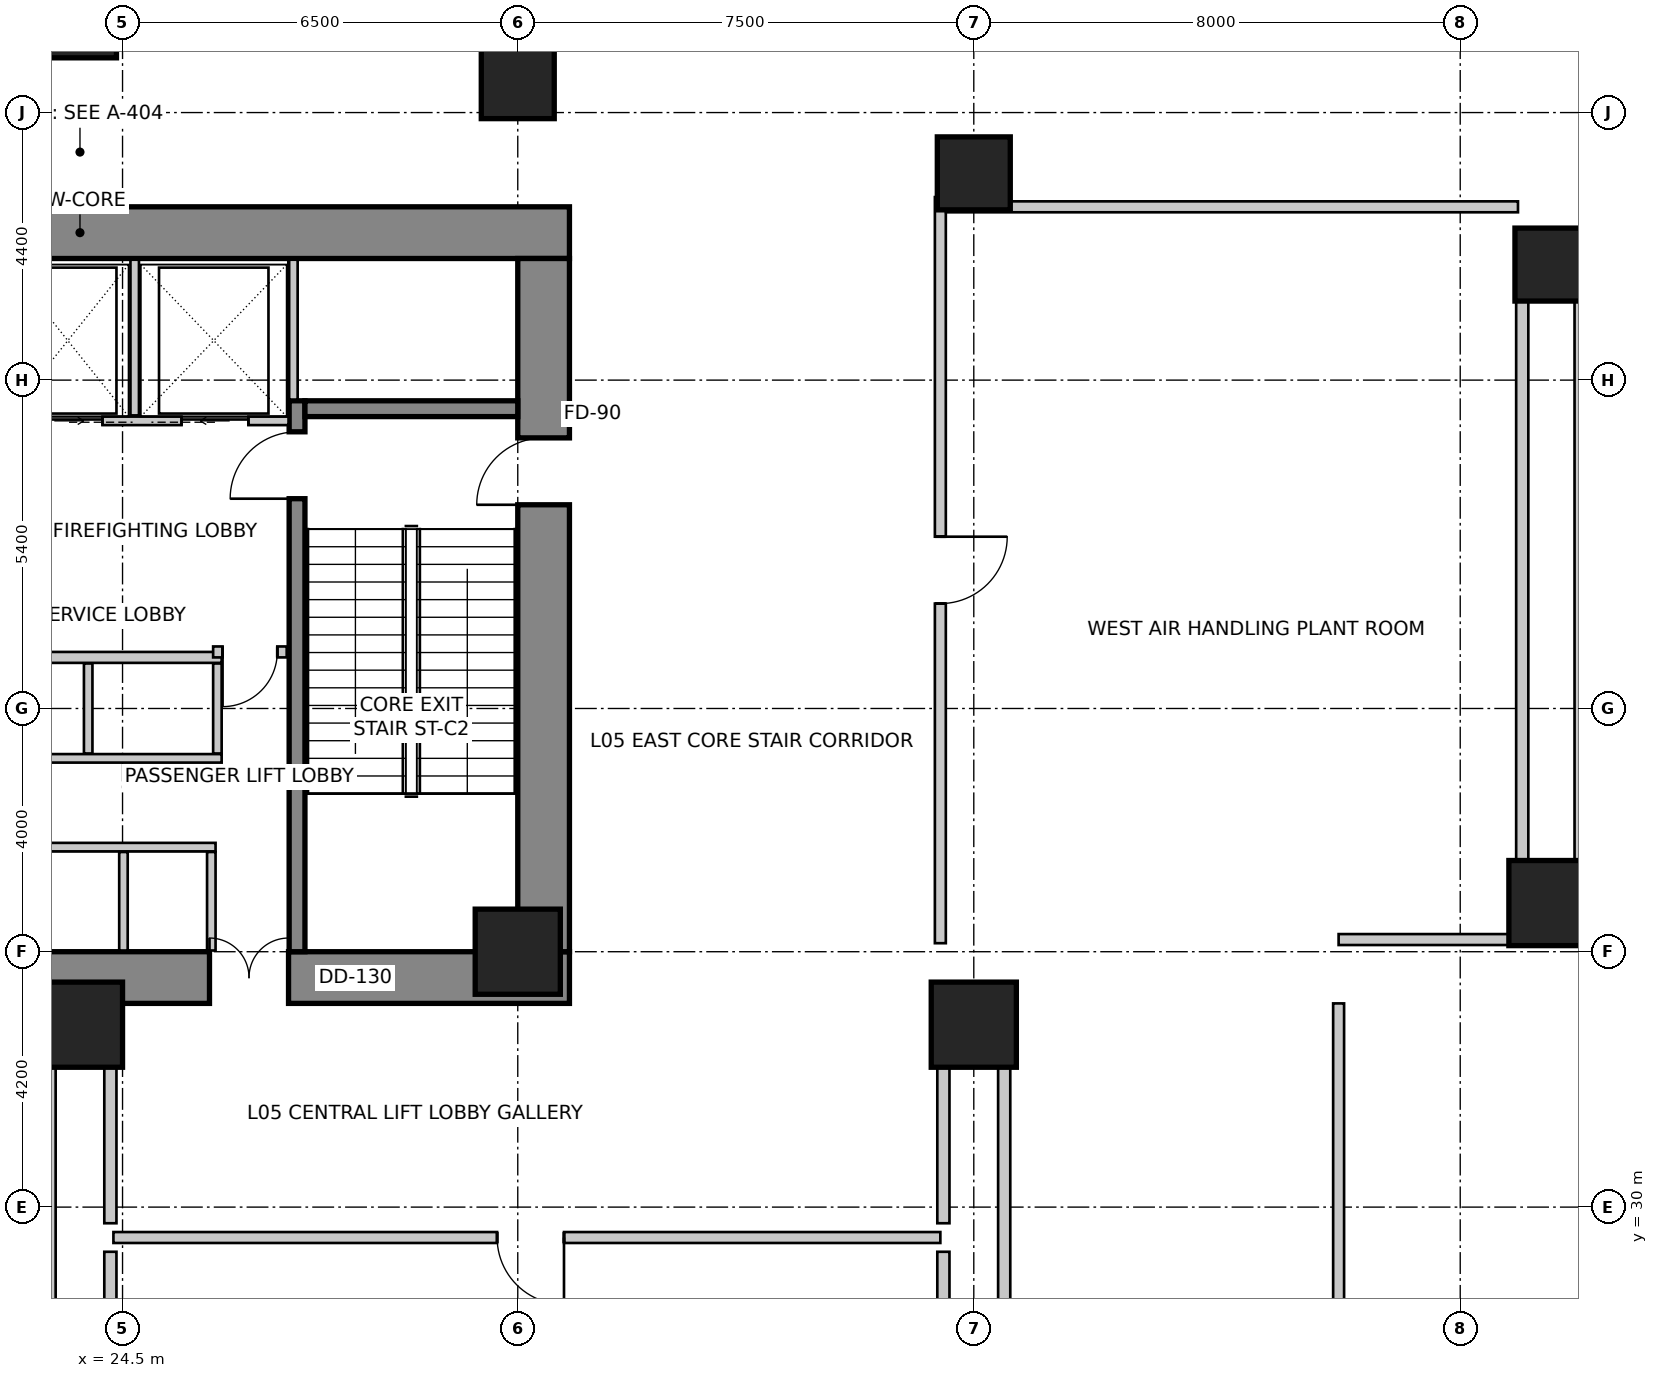
"""IFC4 building model, lengths in metres.
Left out: names, types, materials, properties, quantities, classifications, styles, units other than length and angle.
Written with IfcOpenShell. Run it as: python <this file> out.ifc"""

import sys

from ifc_helpers import new_model, si_unit, direction, frame, frame_2d, origin, origin_2d, place, context, subcontext, project, spatial, rectangle, extrude, source, transform, mapped, element, fill, save


model = new_model("IFC4")
c1 = context("Model", 3, precision=1e-05, world=origin(), true_north=direction((0.0, 1.0)))
c2 = subcontext(c1, "Body", "Model", "MODEL_VIEW")
j1 = project(units=[si_unit("LENGTHUNIT", "METRE"), si_unit("PLANEANGLEUNIT", "RADIAN")], contexts=[c1])
p1 = place(None, origin())
s1 = spatial("IfcSite", under=j1, at=p1, CompositionType="ELEMENT")
p2 = place(p1, origin())
s2 = spatial("IfcBuilding", under=s1, at=p2, CompositionType="ELEMENT")
p3 = place(p2, frame((0.0, 0.0, 21.6)))
s3 = spatial("IfcBuildingStorey", under=s2, at=p3, CompositionType="ELEMENT", Elevation=21.6)
p4 = place(p3, frame((15.75, 46.025, 0.0), z_axis=(0.0, 0.0, 1.0), x_axis=(1.0, 0.0, 0.0)))
e1 = element("IfcWall", 1, at=p4, inside=s3, PredefinedType="SHEAR", context=c2, shape_type="SweptSolid", body=[
    extrude(rectangle(XDim=16.1, YDim=0.85, at=frame_2d((8.05, 0.0))), origin(), (0.0, 0.0, 1.0), 5.4),
])
p5 = place(p3, frame((15.75, 33.775, 0.0), z_axis=(0.0, 0.0, 1.0), x_axis=(1.0, 0.0, 0.0)))
e2 = element("IfcWall", 2, at=p5, inside=s3, PredefinedType="SHEAR", context=c2, shape_type="SweptSolid", body=[
    extrude(rectangle(XDim=16.1, YDim=0.85, at=frame_2d((8.05, 0.0))), origin(), (0.0, 0.0, 1.0), 5.4),
])
m1 = source(origin(), c2, "Body", "SweptSolid", [
    extrude(rectangle(XDim=1.3, YDim=2.15, at=frame_2d((0.65, 1.075))), frame((0.0, 0.435, 0.0), z_axis=(0.0, -1.0, 0.0), x_axis=(1.0, 0.0, 0.0)), (0.0, 0.0, 1.0), 0.87),
])
p6 = place(p5, frame((10.18, 0.0, 0.0)))
e3 = element("IfcOpeningElement", 3, at=p6, cuts=e2, PredefinedType="OPENING", context=c2, shape_type="MappedRepresentation", body=[
    mapped(m1, transform((0.0, 0.0, 0.0), scale=1.0)),
])
p7 = place(p3, frame((31.425, 34.2, 0.0), z_axis=(0.0, 0.0, 1.0), x_axis=(0.0, 1.0, 0.0)))
e4 = element("IfcWall", 4, at=p7, inside=s3, PredefinedType="SHEAR", context=c2, shape_type="SweptSolid", body=[
    extrude(rectangle(XDim=11.4, YDim=0.85, at=frame_2d((5.7, 0.0))), origin(), (0.0, 0.0, 1.0), 5.4),
])
m2 = source(origin(), c2, "Body", "SweptSolid", [
    extrude(rectangle(XDim=1.1, YDim=2.15, at=frame_2d((0.55, 1.075))), frame((0.0, 0.435, 0.0), z_axis=(0.0, -1.0, 0.0), x_axis=(1.0, 0.0, 0.0)), (0.0, 0.0, 1.0), 0.87),
])
p8 = place(p7, frame((7.35, 0.0, 0.0)))
e5 = element("IfcOpeningElement", 5, at=p8, cuts=e4, PredefinedType="OPENING", context=c2, shape_type="MappedRepresentation", body=[
    mapped(m2, transform((0.0, 0.0, 0.0), scale=1.0)),
])
p9 = place(p3, frame((27.37, 34.2, 0.0), z_axis=(0.0, 0.0, 1.0), x_axis=(0.0, 1.0, 0.0)))
e6 = element("IfcWall", 6, at=p9, inside=s3, PredefinedType="SHEAR", context=c2, shape_type="SweptSolid", body=[
    extrude(rectangle(XDim=9.06, YDim=0.26, at=frame_2d((4.53, 0.0))), origin(), (0.0, 0.0, 1.0), 5.4),
])
m3 = source(origin(), c2, "Body", "SweptSolid", [
    extrude(rectangle(XDim=1.1, YDim=2.15, at=frame_2d((0.55, 1.075))), frame((0.0, 0.14, 0.0), z_axis=(0.0, -1.0, 0.0), x_axis=(1.0, 0.0, 0.0)), (0.0, 0.0, 1.0), 0.28),
])
p10 = place(p9, frame((7.45, 0.0, 0.0)))
e7 = element("IfcOpeningElement", 7, at=p10, cuts=e6, PredefinedType="OPENING", context=c2, shape_type="MappedRepresentation", body=[
    mapped(m3, transform((0.0, 0.0, 0.0), scale=1.0)),
])
p11 = place(p3, frame((27.5, 43.13, 0.0), z_axis=(0.0, 0.0, 1.0), x_axis=(1.0, 0.0, 0.0)))
e8 = element("IfcWall", 8, at=p11, inside=s3, PredefinedType="SHEAR", context=c2, shape_type="SweptSolid", body=[
    extrude(rectangle(XDim=3.5, YDim=0.26, at=frame_2d((1.75, 0.0))), origin(), (0.0, 0.0, 1.0), 5.4),
])
m4 = source(origin(), c2, "Body", "SweptSolid", [
    extrude(rectangle(XDim=1.4, YDim=1.4, at=origin_2d()), origin(), (0.0, 0.0, 1.0), 5.4),
])
for number, where, z_axis, x_axis in (
    (9, (23.8, 33.0, 0.0), (0.0, 0.0, 1.0), (1.0, 0.0, 0.0)),
    (10, (31.0, 34.2, 0.0), (0.0, 0.0, 1.0), (1.0, 0.0, 0.0)),
    (11, (38.5, 33.0, 0.0), (0.0, 0.0, 1.0), (1.0, 0.0, 0.0)),
    (12, (48.0, 35.0, 0.0), (0.0, 0.0, 1.0), (1.0, 0.0, 0.0)),
):
    element("IfcColumn", number, at=place(p3, frame(where, z_axis=z_axis, x_axis=x_axis)), inside=s3, PredefinedType="COLUMN", context=c2, shape_type="MappedRepresentation", body=[
        mapped(m4, transform((0.0, 0.0, 0.0), scale=1.0)),
    ])
m5 = source(origin(), c2, "Body", "SweptSolid", [
    extrude(rectangle(XDim=1.2, YDim=1.2, at=origin_2d()), origin(), (0.0, 0.0, 1.0), 5.4),
])
for number, where, z_axis, x_axis in (
    (13, (23.8, 49.5, 0.0), (0.0, 0.0, 1.0), (1.0, 0.0, 0.0)),
    (14, (31.0, 48.5, 0.0), (0.0, 0.0, 1.0), (1.0, 0.0, 0.0)),
    (15, (38.5, 47.0, 0.0), (0.0, 0.0, 1.0), (1.0, 0.0, 0.0)),
    (16, (48.0, 45.5, 0.0), (0.0, 0.0, 1.0), (1.0, 0.0, 0.0)),
):
    element("IfcColumn", number, at=place(p3, frame(where, z_axis=z_axis, x_axis=x_axis)), inside=s3, PredefinedType="COLUMN", context=c2, shape_type="MappedRepresentation", body=[
        mapped(m5, transform((0.0, 0.0, 0.0), scale=1.0)),
    ])
p12 = place(p3, frame((20.37, 42.93, 0.0), z_axis=(0.0, 0.0, 1.0), x_axis=(1.0, 0.0, 0.0)))
e17 = element("IfcWall", 17, at=p12, inside=s3, PredefinedType="SOLIDWALL", context=c2, shape_type="SweptSolid", body=[
    extrude(rectangle(XDim=6.86, YDim=0.14, at=frame_2d((3.43, 0.0))), origin(), (0.0, 0.0, 1.0), 5.05),
])
m6 = source(origin(), c2, "Body", "SweptSolid", [
    extrude(rectangle(XDim=1.1, YDim=2.15, at=frame_2d((0.55, 1.075))), frame((0.0, 0.08, 0.0), z_axis=(0.0, -1.0, 0.0), x_axis=(1.0, 0.0, 0.0)), (0.0, 0.0, 1.0), 0.16),
])
p13 = place(p12, frame((0.5, 0.0, 0.0)))
e18 = element("IfcOpeningElement", 18, at=p13, cuts=e17, PredefinedType="OPENING", context=c2, shape_type="MappedRepresentation", body=[
    mapped(m6, transform((0.0, 0.0, 0.0), scale=1.0)),
])
p14 = place(p12, frame((2.7, 0.0, 0.0)))
e19 = element("IfcOpeningElement", 19, at=p14, cuts=e17, PredefinedType="OPENING", context=c2, shape_type="MappedRepresentation", body=[
    mapped(m6, transform((0.0, 0.0, 0.0), scale=1.0)),
])
p15 = place(p12, frame((5.1, 0.0, 0.0)))
e20 = element("IfcOpeningElement", 20, at=p15, cuts=e17, PredefinedType="OPENING", context=c2, shape_type="MappedRepresentation", body=[
    mapped(m6, transform((0.0, 0.0, 0.0), scale=1.0)),
])
p16 = place(p3, frame((27.31, 43.28, 0.0), z_axis=(0.0, 0.0, 1.0), x_axis=(0.0, 1.0, 0.0)))
e21 = element("IfcWall", 21, at=p16, inside=s3, PredefinedType="SOLIDWALL", context=c2, shape_type="SweptSolid", body=[
    extrude(rectangle(XDim=2.3, YDim=0.14, at=frame_2d((1.15, 0.0))), origin(), (0.0, 0.0, 1.0), 5.05),
])
p17 = place(p3, frame((24.7, 43.02, 0.0), z_axis=(0.0, 0.0, 1.0), x_axis=(0.0, 1.0, 0.0)))
e22 = element("IfcWall", 22, at=p17, inside=s3, PredefinedType="SOLIDWALL", context=c2, shape_type="SweptSolid", body=[
    extrude(rectangle(XDim=2.56, YDim=0.14, at=frame_2d((1.28, 0.0))), origin(), (0.0, 0.0, 1.0), 5.05),
])
p18 = place(p3, frame((20.38, 35.92, 0.0), z_axis=(0.0, 0.0, 1.0), x_axis=(1.0, 0.0, 0.0)))
e23 = element("IfcWall", 23, at=p18, inside=s3, PredefinedType="SOLIDWALL", context=c2, shape_type="SweptSolid", body=[
    extrude(rectangle(XDim=5.65, YDim=0.14, at=frame_2d((2.825, 0.0))), origin(), (0.0, 0.0, 1.0), 5.05),
])
for number, where, z_axis, x_axis in (
    (24, (25.96, 34.22, 0.0), (0.0, 0.0, 1.0), (0.0, 1.0, 0.0)),
    (25, (24.515, 34.22, 0.0), (0.0, 0.0, 1.0), (0.0, 1.0, 0.0)),
):
    element("IfcWall", number, at=place(p3, frame(where, z_axis=z_axis, x_axis=x_axis)), inside=s3, PredefinedType="SOLIDWALL", context=c2, shape_type="SweptSolid", body=[
        extrude(rectangle(XDim=1.62, YDim=0.14, at=frame_2d((0.81, 0.0))), origin(), (0.0, 0.0, 1.0), 5.05),
    ])
p19 = place(p3, frame((20.38, 37.38, 0.0), z_axis=(0.0, 0.0, 1.0), x_axis=(1.0, 0.0, 0.0)))
e26 = element("IfcWall", 26, at=p19, inside=s3, PredefinedType="SOLIDWALL", context=c2, shape_type="SweptSolid", body=[
    extrude(rectangle(XDim=5.75, YDim=0.14, at=frame_2d((2.875, 0.0))), origin(), (0.0, 0.0, 1.0), 5.05),
])
p20 = place(p3, frame((20.38, 39.04, 0.0), z_axis=(0.0, 0.0, 1.0), x_axis=(1.0, 0.0, 0.0)))
e27 = element("IfcWall", 27, at=p20, inside=s3, PredefinedType="SOLIDWALL", context=c2, shape_type="SweptSolid", body=[
    extrude(rectangle(XDim=5.75, YDim=0.18, at=frame_2d((2.875, 0.0))), origin(), (0.0, 0.0, 1.0), 5.05),
])
for number, where, z_axis, x_axis in (
    (28, (26.06, 37.46, 0.0), (0.0, 0.0, 1.0), (0.0, 1.0, 0.0)),
    (29, (23.935, 37.46, 0.0), (0.0, 0.0, 1.0), (0.0, 1.0, 0.0)),
):
    element("IfcWall", number, at=place(p3, frame(where, z_axis=z_axis, x_axis=x_axis)), inside=s3, PredefinedType="SOLIDWALL", context=c2, shape_type="SweptSolid", body=[
        extrude(rectangle(XDim=1.48, YDim=0.14, at=frame_2d((0.74, 0.0))), origin(), (0.0, 0.0, 1.0), 5.05),
    ])
p21 = place(p3, frame((27.2, 39.13, 0.0), z_axis=(0.0, 0.0, 1.0), x_axis=(-1.0, 0.0, 0.0)))
e30 = element("IfcWall", 30, at=p21, inside=s3, PredefinedType="PARTITIONING", context=c2, shape_type="SweptSolid", body=[
    extrude(rectangle(XDim=1.21, YDim=0.18, at=frame_2d((0.605, 0.0))), origin(), (0.0, 0.0, 1.0), 5.05),
])
m7 = source(origin(), c2, "Body", "SweptSolid", [
    extrude(rectangle(XDim=0.9, YDim=2.15, at=frame_2d((0.45, 1.075))), frame((0.0, 0.1, 0.0), z_axis=(0.0, -1.0, 0.0), x_axis=(1.0, 0.0, 0.0)), (0.0, 0.0, 1.0), 0.2),
])
p22 = place(p21, frame((0.155, 0.0, 0.0)))
e31 = element("IfcOpeningElement", 31, at=p22, cuts=e30, PredefinedType="OPENING", context=c2, shape_type="MappedRepresentation", body=[
    mapped(m7, transform((0.0, 0.0, 0.0), scale=1.0)),
])
p23 = place(p3, frame((37.95, 29.5, 0.0), z_axis=(0.0, 0.0, 1.0), x_axis=(-1.0, 0.0, 0.0)))
e32 = element("IfcWall", 32, at=p23, inside=s3, PredefinedType="PARTITIONING", context=c2, shape_type="SweptSolid", body=[
    extrude(rectangle(XDim=13.6, YDim=0.18, at=frame_2d((6.8, 0.0))), origin(), (0.0, 0.0, 1.0), 5.05),
])
m8 = source(origin(), c2, "Body", "SweptSolid", [
    extrude(rectangle(XDim=1.1, YDim=2.15, at=frame_2d((0.55, 1.075))), frame((0.0, 0.1, 0.0), z_axis=(0.0, -1.0, 0.0), x_axis=(1.0, 0.0, 0.0)), (0.0, 0.0, 1.0), 0.2),
])
p24 = place(p23, frame((6.19, 0.0, 0.0)))
e33 = element("IfcOpeningElement", 33, at=p24, cuts=e32, PredefinedType="OPENING", context=c2, shape_type="MappedRepresentation", body=[
    mapped(m8, transform((0.0, 0.0, 0.0), scale=1.0)),
])
p25 = place(p3, frame((44.5, 33.35, 0.0), z_axis=(0.0, 0.0, 1.0), x_axis=(0.0, -1.0, 0.0)))
e34 = element("IfcWall", 34, at=p25, inside=s3, PredefinedType="PARTITIONING", context=c2, shape_type="SweptSolid", body=[
    extrude(rectangle(XDim=18.96, YDim=0.18, at=frame_2d((9.48, 0.0))), origin(), (0.0, 0.0, 1.0), 3.822),
])
m9 = source(origin(), c2, "Body", "SweptSolid", [
    extrude(rectangle(XDim=1.4, YDim=2.15, at=frame_2d((0.7, 1.075))), frame((0.0, 0.1, 0.0), z_axis=(0.0, -1.0, 0.0), x_axis=(1.0, 0.0, 0.0)), (0.0, 0.0, 1.0), 0.2),
])
p26 = place(p25, frame((8.72, 0.0, 0.0)))
e35 = element("IfcOpeningElement", 35, at=p26, cuts=e34, PredefinedType="OPENING", context=c2, shape_type="MappedRepresentation", body=[
    mapped(m9, transform((0.0, 0.0, 0.0), scale=1.0)),
])
p27 = place(p3, frame((37.95, 46.61, 0.0), z_axis=(0.0, 0.0, 1.0), x_axis=(0.0, -1.0, 0.0)))
e36 = element("IfcWall", 36, at=p27, inside=s3, PredefinedType="PARTITIONING", context=c2, shape_type="SweptSolid", body=[
    extrude(rectangle(XDim=12.27, YDim=0.18, at=frame_2d((6.135, 0.0))), origin(), (0.0, 0.0, 1.0), 5.05),
])
p28 = place(p27, frame((5.585, 0.0, 0.0)))
e37 = element("IfcOpeningElement", 37, at=p28, cuts=e36, PredefinedType="OPENING", context=c2, shape_type="MappedRepresentation", body=[
    mapped(m8, transform((0.0, 0.0, 0.0), scale=1.0)),
])
p29 = place(p3, frame((47.45, 46.45, 0.0), z_axis=(0.0, 0.0, 1.0), x_axis=(-1.0, 0.0, 0.0)))
e38 = element("IfcWall", 38, at=p29, inside=s3, PredefinedType="PARTITIONING", context=c2, shape_type="SweptSolid", body=[
    extrude(rectangle(XDim=9.406, YDim=0.18, at=frame_2d((4.703, 0.0))), origin(), (0.0, 0.0, 1.0), 3.842),
])
p30 = place(p3, frame((44.5, 34.4, 0.0), z_axis=(0.0, 0.0, 1.0), x_axis=(1.0, 0.0, 0.0)))
e39 = element("IfcWall", 39, at=p30, inside=s3, PredefinedType="PARTITIONING", context=c2, shape_type="SweptSolid", body=[
    extrude(rectangle(XDim=3.075, YDim=0.18, at=frame_2d((1.537, 0.0))), origin(), (0.0, 0.0, 1.0), 3.822),
])
p31 = place(p3, frame((48.39, 34.4, 0.0), z_axis=(0.0, 0.0, 1.0), x_axis=(1.0, 0.0, 0.0)))
e40 = element("IfcWall", 40, at=p31, inside=s3, PredefinedType="PARTITIONING", context=c2, shape_type="SweptSolid", body=[
    extrude(rectangle(XDim=19.345, YDim=0.18, at=frame_2d((9.673, 0.0))), origin(), (0.0, 0.0, 1.0), 3.822),
])
p32 = place(p31, frame((9.062, 0.0, 0.0)))
e41 = element("IfcOpeningElement", 41, at=p32, cuts=e40, PredefinedType="OPENING", context=c2, shape_type="MappedRepresentation", body=[
    mapped(m8, transform((0.0, 0.0, 0.0), scale=1.0)),
])
p33 = place(p3, frame((24.3, 33.412, 0.0), z_axis=(0.0, 0.0, 1.0), x_axis=(0.0, -1.0, 0.0)))
e42 = element("IfcWall", 42, at=p33, inside=s3, PredefinedType="SOLIDWALL", context=c2, shape_type="SweptSolid", body=[
    extrude(rectangle(XDim=3.678, YDim=0.2, at=frame_2d((1.839, 0.0))), origin(), (0.0, 0.0, 1.0), 3.042),
])
p34 = place(p3, frame((24.3, 29.265, 0.0), z_axis=(0.0, 0.0, 1.0), x_axis=(0.0, -1.0, 0.0)))
e43 = element("IfcWall", 43, at=p34, inside=s3, PredefinedType="SOLIDWALL", context=c2, shape_type="SweptSolid", body=[
    extrude(rectangle(XDim=14.775, YDim=0.2, at=frame_2d((7.388, 0.0))), origin(), (0.0, 0.0, 1.0), 3.042),
])
p35 = place(p3, frame((23.3, 14.49, 0.0), z_axis=(0.0, 0.0, 1.0), x_axis=(0.0, 1.0, 0.0)))
e44 = element("IfcWall", 44, at=p35, inside=s3, PredefinedType="SOLIDWALL", context=c2, shape_type="SweptSolid", body=[
    extrude(rectangle(XDim=18.872, YDim=0.2, at=frame_2d((9.436, 0.0))), origin(), (0.0, 0.0, 1.0), 3.042),
])
p36 = place(p3, frame((39.0, 33.412, 0.0), z_axis=(0.0, 0.0, 1.0), x_axis=(0.0, -1.0, 0.0)))
e45 = element("IfcWall", 45, at=p36, inside=s3, PredefinedType="SOLIDWALL", context=c2, shape_type="SweptSolid", body=[
    extrude(rectangle(XDim=18.78, YDim=0.2, at=frame_2d((9.39, 0.0))), origin(), (0.0, 0.0, 1.0), 3.042),
])
p37 = place(p3, frame((38.0, 14.49, 0.0), z_axis=(0.0, 0.0, 1.0), x_axis=(0.0, 1.0, 0.0)))
e46 = element("IfcWall", 46, at=p37, inside=s3, PredefinedType="SOLIDWALL", context=c2, shape_type="SweptSolid", body=[
    extrude(rectangle(XDim=14.775, YDim=0.2, at=frame_2d((7.388, 0.0))), origin(), (0.0, 0.0, 1.0), 3.042),
])
p38 = place(p3, frame((38.0, 29.735, 0.0), z_axis=(0.0, 0.0, 1.0), x_axis=(0.0, 1.0, 0.0)))
e47 = element("IfcWall", 47, at=p38, inside=s3, PredefinedType="SOLIDWALL", context=c2, shape_type="SweptSolid", body=[
    extrude(rectangle(XDim=3.965, YDim=0.2, at=frame_2d((1.983, 0.0))), origin(), (0.0, 0.0, 1.0), 3.042),
])
for number, where, z_axis, x_axis in (
    (48, (48.48, 46.0, 0.0), (0.0, 0.0, 1.0), (0.0, -1.0, 0.0)),
    (49, (47.52, 34.64, 0.0), (0.0, 0.0, 1.0), (0.0, 1.0, 0.0)),
):
    element("IfcWall", number, at=place(p3, frame(where, z_axis=z_axis, x_axis=x_axis)), inside=s3, PredefinedType="SOLIDWALL", context=c2, shape_type="SweptSolid", body=[
        extrude(rectangle(XDim=11.36, YDim=0.2, at=frame_2d((5.68, 0.0))), origin(), (0.0, 0.0, 1.0), 3.042),
    ])
m10 = source(origin(), c2, "Body", "SweptSolid", [
    extrude(rectangle(XDim=1.1, YDim=2.15, at=frame_2d((0.55, 1.075))), frame((0.0, 0.025, 0.0), z_axis=(0.0, -1.0, 0.0), x_axis=(1.0, 0.0, 0.0)), (0.0, 0.0, 1.0), 0.05),
])
p39 = place(p14, origin())
e50 = element("IfcDoor", 50, at=p39, inside=s3, OperationType="SLIDING_TO_RIGHT", PredefinedType="DOOR", context=c2, shape_type="MappedRepresentation", body=[
    mapped(m10, transform((0.0, 0.0, 0.0), scale=1.0)),
])
fill(e19, e50)
m11 = source(origin(), c2, "Body", "SweptSolid", [
    extrude(rectangle(XDim=1.1, YDim=2.15, at=frame_2d((0.55, 1.075))), frame((0.0, 0.025, 0.0), z_axis=(0.0, -1.0, 0.0), x_axis=(1.0, 0.0, 0.0)), (0.0, 0.0, 1.0), 0.05),
])
p40 = place(p15, origin())
e51 = element("IfcDoor", 51, at=p40, inside=s3, OperationType="SLIDING_TO_LEFT", PredefinedType="DOOR", context=c2, shape_type="MappedRepresentation", body=[
    mapped(m11, transform((0.0, 0.0, 0.0), scale=1.0)),
])
fill(e20, e51)
m12 = source(origin(), c2, "Body", "SweptSolid", [
    extrude(rectangle(XDim=1.1, YDim=2.15, at=frame_2d((0.55, 1.075))), frame((0.0, 0.025, 0.0), z_axis=(0.0, -1.0, 0.0), x_axis=(1.0, 0.0, 0.0)), (0.0, 0.0, 1.0), 0.05),
])
p41 = place(p10, origin())
e52 = element("IfcDoor", 52, at=p41, inside=s3, OperationType="SINGLE_SWING_LEFT", PredefinedType="DOOR", context=c2, shape_type="MappedRepresentation", body=[
    mapped(m12, transform((0.0, 0.0, 0.0), scale=1.0)),
])
fill(e7, e52)
p42 = place(p8, origin())
e53 = element("IfcDoor", 53, at=p42, inside=s3, OperationType="SINGLE_SWING_LEFT", PredefinedType="DOOR", context=c2, shape_type="MappedRepresentation", body=[
    mapped(m12, transform((0.0, 0.0, 0.0), scale=1.0)),
])
fill(e5, e53)
m13 = source(origin(), c2, "Body", "SweptSolid", [
    extrude(rectangle(XDim=1.3, YDim=2.15, at=frame_2d((0.65, 1.075))), frame((0.0, 0.025, 0.0), z_axis=(0.0, -1.0, 0.0), x_axis=(1.0, 0.0, 0.0)), (0.0, 0.0, 1.0), 0.05),
])
p43 = place(p6, origin())
e54 = element("IfcDoor", 54, at=p43, inside=s3, OperationType="DOUBLE_DOOR_SINGLE_SWING", PredefinedType="DOOR", context=c2, shape_type="MappedRepresentation", body=[
    mapped(m13, transform((0.0, 0.0, 0.0), scale=1.0)),
])
fill(e3, e54)
m14 = source(origin(), c2, "Body", "SweptSolid", [
    extrude(rectangle(XDim=0.9, YDim=2.15, at=frame_2d((0.45, 1.075))), frame((0.0, 0.025, 0.0), z_axis=(0.0, -1.0, 0.0), x_axis=(1.0, 0.0, 0.0)), (0.0, 0.0, 1.0), 0.05),
])
p44 = place(p22, origin())
e55 = element("IfcDoor", 55, at=p44, inside=s3, OperationType="SINGLE_SWING_RIGHT", PredefinedType="DOOR", context=c2, shape_type="MappedRepresentation", body=[
    mapped(m14, transform((0.0, 0.0, 0.0), scale=1.0)),
])
fill(e31, e55)
p45 = place(p24, origin())
e56 = element("IfcDoor", 56, at=p45, inside=s3, OperationType="SINGLE_SWING_LEFT", PredefinedType="DOOR", context=c2, shape_type="MappedRepresentation", body=[
    mapped(m12, transform((0.0, 0.0, 0.0), scale=1.0)),
])
fill(e33, e56)
p46 = place(p28, origin())
e57 = element("IfcDoor", 57, at=p46, inside=s3, OperationType="SINGLE_SWING_LEFT", PredefinedType="DOOR", context=c2, shape_type="MappedRepresentation", body=[
    mapped(m12, transform((0.0, 0.0, 0.0), scale=1.0)),
])
fill(e37, e57)
save(model, sys.argv[1])
